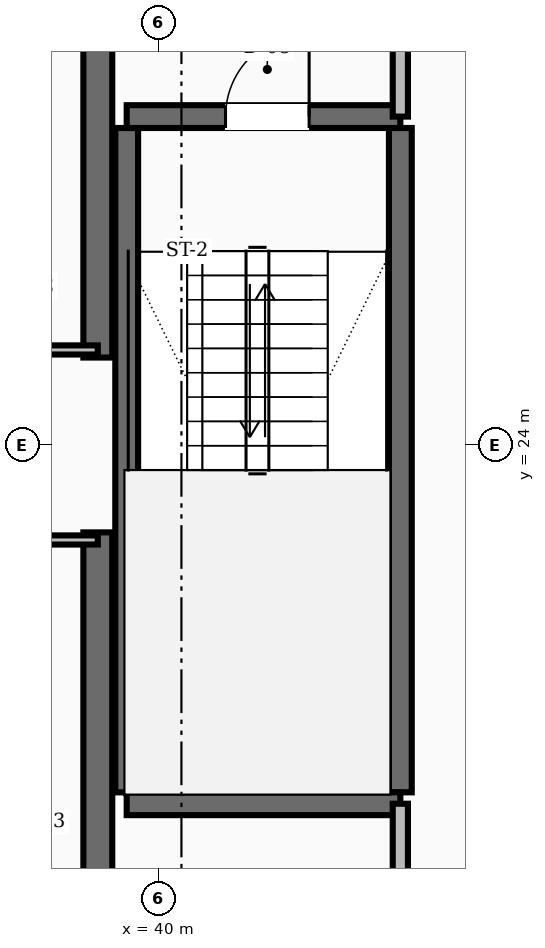
"""IFC4 building model, lengths in metres.
Left out: names, types, materials, properties, quantities, classifications, styles, units other than length and angle.
Written with IfcOpenShell. Run it as: python <this file> out.ifc"""

import sys

from ifc_helpers import new_model, si_unit, direction, frame, frame_2d, origin, place, context, subcontext, project, spatial, rectangle, extrude, element, fill, save


model = new_model("IFC4")
c1 = context("Model", 3, precision=1e-05, world=origin(), true_north=direction((0.0, 1.0)))
c2 = subcontext(c1, "Body", "Model", "MODEL_VIEW")
j1 = project(units=[si_unit("LENGTHUNIT", "METRE"), si_unit("PLANEANGLEUNIT", "RADIAN")], contexts=[c1])
p1 = place(None, origin())
s1 = spatial("IfcSite", under=j1, at=p1, CompositionType="ELEMENT")
p2 = place(p1, origin())
s2 = spatial("IfcBuilding", under=s1, at=p2, CompositionType="ELEMENT")
p3 = place(p2, frame((0.0, 0.0, 70.0)))
s3 = spatial("IfcBuildingStorey", under=s2, at=p3, CompositionType="ELEMENT", Elevation=70.0)
for number, where, z_axis, x_axis in (
    (1, (39.2, 16.55, 0.0), (0.0, 0.0, 1.0), (0.0, 1.0, 0.0)),
    (2, (39.2, 25.15, 0.0), (0.0, 0.0, 1.0), (0.0, 1.0, 0.0)),
):
    element("IfcWall", number, at=place(p3, frame(where, z_axis=z_axis, x_axis=x_axis)), inside=s3, PredefinedType="SHEAR", context=c2, shape_type="SweptSolid", body=[
        extrude(rectangle(XDim=6.3, YDim=0.38, at=frame_2d((3.15, 0.0))), origin(), (0.0, 0.0, 1.0), 3.6),
    ])
for number, where, z_axis, x_axis in (
    (3, (43.18, 19.43, 0.0), (0.0, 0.0, 1.0), (0.0, 1.0, 0.0)),
    (4, (39.58, 19.43, 0.0), (0.0, 0.0, 1.0), (0.0, 1.0, 0.0)),
):
    element("IfcWall", number, at=place(p3, frame(where, z_axis=z_axis, x_axis=x_axis)), inside=s3, PredefinedType="SHEAR", context=c2, shape_type="SweptSolid", body=[
        extrude(rectangle(XDim=8.74, YDim=0.3, at=frame_2d((4.37, 0.0))), origin(), (0.0, 0.0, 1.0), 3.6),
    ])
p4 = place(p3, frame((39.58, 19.28, 0.0), z_axis=(0.0, 0.0, 1.0), x_axis=(1.0, 0.0, 0.0)))
e5 = element("IfcWall", 5, at=p4, inside=s3, PredefinedType="SHEAR", context=c2, shape_type="SweptSolid", body=[
    extrude(rectangle(XDim=3.6, YDim=0.3, at=frame_2d((1.8, 0.0))), origin(), (0.0, 0.0, 1.0), 3.6),
])
p5 = place(p3, frame((39.58, 28.32, 0.0), z_axis=(0.0, 0.0, 1.0), x_axis=(1.0, 0.0, 0.0)))
e6 = element("IfcWall", 6, at=p5, inside=s3, PredefinedType="SHEAR", context=c2, shape_type="SweptSolid", body=[
    extrude(rectangle(XDim=3.6, YDim=0.3, at=frame_2d((1.8, 0.0))), origin(), (0.0, 0.0, 1.0), 3.6),
])
p6 = place(p5, frame((1.3, 0.0, 0.0)))
e7 = element("IfcOpeningElement", 7, at=p6, cuts=e6, PredefinedType="OPENING", context=c2, shape_type="SweptSolid", body=[
    extrude(rectangle(XDim=1.1, YDim=2.1, at=frame_2d((0.55, 1.05))), frame((0.0, 0.16, 0.0), z_axis=(0.0, -1.0, 0.0), x_axis=(1.0, 0.0, 0.0)), (0.0, 0.0, 1.0), 0.32),
])
p7 = place(p3, frame((43.18, 28.32, 0.0), z_axis=(0.0, 0.0, 1.0), x_axis=(0.0, 1.0, 0.0)))
e8 = element("IfcWall", 8, at=p7, inside=s3, PredefinedType="SOLIDWALL", context=c2, shape_type="SweptSolid", body=[
    extrude(rectangle(XDim=3.13, YDim=0.2, at=frame_2d((1.565, 0.0))), origin(), (0.0, 0.0, 1.0), 2.71),
])
p8 = place(p7, frame((1.015, 0.0, 0.0)))
e9 = element("IfcOpeningElement", 9, at=p8, cuts=e8, PredefinedType="OPENING", context=c2, shape_type="SweptSolid", body=[
    extrude(rectangle(XDim=1.1, YDim=2.1, at=frame_2d((0.55, 1.05))), frame((0.0, 0.11, 0.0), z_axis=(0.0, -1.0, 0.0), x_axis=(1.0, 0.0, 0.0)), (0.0, 0.0, 1.0), 0.22),
])
p9 = place(p3, frame((43.18, 16.55, 0.0), z_axis=(0.0, 0.0, 1.0), x_axis=(0.0, 1.0, 0.0)))
e10 = element("IfcWall", 10, at=p9, inside=s3, PredefinedType="SOLIDWALL", context=c2, shape_type="SweptSolid", body=[
    extrude(rectangle(XDim=2.73, YDim=0.2, at=frame_2d((1.365, 0.0))), origin(), (0.0, 0.0, 1.0), 2.71),
])
p10 = place(p9, frame((0.89, 0.0, 0.0)))
e11 = element("IfcOpeningElement", 11, at=p10, cuts=e10, PredefinedType="OPENING", context=c2, shape_type="SweptSolid", body=[
    extrude(rectangle(XDim=0.95, YDim=2.1, at=frame_2d((0.475, 1.05))), frame((0.0, 0.11, 0.0), z_axis=(0.0, -1.0, 0.0), x_axis=(1.0, 0.0, 0.0)), (0.0, 0.0, 1.0), 0.22),
])
for number, where, z_axis, x_axis in (
    (12, (37.4, 25.25, 0.0), (0.0, 0.0, 1.0), (1.0, 0.0, 0.0)),
    (13, (37.4, 22.75, 0.0), (0.0, 0.0, 1.0), (1.0, 0.0, 0.0)),
):
    element("IfcWall", number, at=place(p3, frame(where, z_axis=z_axis, x_axis=x_axis)), inside=s3, PredefinedType="PARTITIONING", context=c2, shape_type="SweptSolid", body=[
        extrude(rectangle(XDim=1.8, YDim=0.12, at=frame_2d((0.9, 0.0))), origin(), (0.0, 0.0, 1.0), 2.71),
    ])
p11 = place(p6, origin())
e14 = element("IfcDoor", 14, at=p11, inside=s3, OperationType="SINGLE_SWING_RIGHT", PredefinedType="DOOR", context=c2, shape_type="SweptSolid", body=[
    extrude(rectangle(XDim=1.1, YDim=2.1, at=frame_2d((0.55, 1.05))), frame((0.0, 0.025, 0.0), z_axis=(0.0, -1.0, 0.0), x_axis=(1.0, 0.0, 0.0)), (0.0, 0.0, 1.0), 0.05),
])
fill(e7, e14)
save(model, sys.argv[1])
